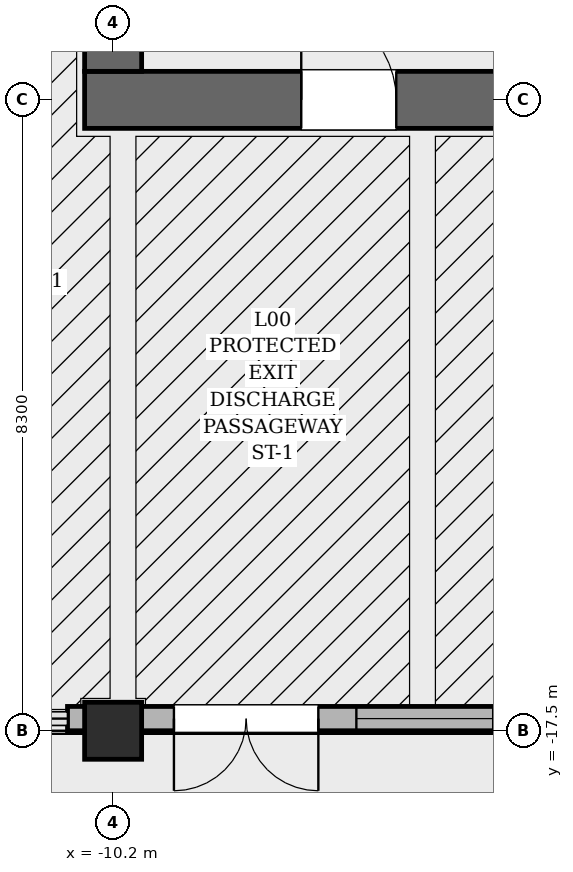
"""IFC4 building model, lengths in metres.
Left out: names, types, materials, properties, quantities, classifications, styles, units other than length and angle.
Written with IfcOpenShell. Run it as: python <this file> out.ifc"""

import sys

from ifc_helpers import new_model, si_unit, direction, frame, frame_2d, origin, origin_2d, place, context, subcontext, project, spatial, rectangle, circle, extrude, element, fill, save


model = new_model("IFC4")
c1 = context("Model", 3, precision=1e-05, world=origin(), true_north=direction((0.0, 1.0)))
c2 = subcontext(c1, "Body", "Model", "MODEL_VIEW")
j1 = project(units=[si_unit("LENGTHUNIT", "METRE"), si_unit("PLANEANGLEUNIT", "RADIAN")], contexts=[c1])
p1 = place(None, origin())
s1 = spatial("IfcSite", under=j1, at=p1, CompositionType="ELEMENT")
p2 = place(p1, origin())
s2 = spatial("IfcBuilding", under=s1, at=p2, CompositionType="ELEMENT")
p3 = place(p2, origin())
s3 = spatial("IfcBuildingStorey", under=s2, at=p3, CompositionType="ELEMENT", Elevation=0.0)
p4 = place(p3, frame((10.575, -9.2, 0.0), z_axis=(0.0, 0.0, 1.0), x_axis=(-1.0, 0.0, 0.0)))
e1 = element("IfcWall", 1, at=p4, inside=s3, PredefinedType="SHEAR", context=c2, shape_type="SweptSolid", body=[
    extrude(rectangle(XDim=21.15, YDim=0.75, at=frame_2d((10.575, 0.0))), origin(), (0.0, 0.0, 1.0), 6.0),
])
p5 = place(p4, frame((2.85, 0.0, 0.0)))
e2 = element("IfcOpeningElement", 2, at=p5, cuts=e1, PredefinedType="OPENING", context=c2, shape_type="SweptSolid", body=[
    extrude(rectangle(XDim=1.25, YDim=2.25, at=frame_2d((0.625, 1.125))), frame((0.0, 0.385, 0.0), z_axis=(0.0, -1.0, 0.0), x_axis=(1.0, 0.0, 0.0)), (0.0, 0.0, 1.0), 0.77),
])
p6 = place(p4, frame((17.05, 0.0, 0.0)))
e3 = element("IfcOpeningElement", 3, at=p6, cuts=e1, PredefinedType="OPENING", context=c2, shape_type="SweptSolid", body=[
    extrude(rectangle(XDim=1.25, YDim=2.25, at=frame_2d((0.625, 1.125))), frame((0.0, 0.385, 0.0), z_axis=(0.0, -1.0, 0.0), x_axis=(1.0, 0.0, 0.0)), (0.0, 0.0, 1.0), 0.77),
])
p7 = place(p4, frame((11.075, 0.0, 0.0)))
e4 = element("IfcOpeningElement", 4, at=p7, cuts=e1, PredefinedType="OPENING", context=c2, shape_type="SweptSolid", body=[
    extrude(rectangle(XDim=1.2, YDim=2.3, at=frame_2d((0.6, 1.15))), frame((0.0, 0.385, 0.0), z_axis=(0.0, -1.0, 0.0), x_axis=(1.0, 0.0, 0.0)), (0.0, 0.0, 1.0), 0.77),
])
p8 = place(p4, frame((8.875, 0.0, 0.0)))
e5 = element("IfcOpeningElement", 5, at=p8, cuts=e1, PredefinedType="OPENING", context=c2, shape_type="SweptSolid", body=[
    extrude(rectangle(XDim=1.2, YDim=2.3, at=frame_2d((0.6, 1.15))), frame((0.0, 0.385, 0.0), z_axis=(0.0, -1.0, 0.0), x_axis=(1.0, 0.0, 0.0)), (0.0, 0.0, 1.0), 0.77),
])
p9 = place(p3, frame((-10.2, -8.825, 0.0), z_axis=(0.0, 0.0, 1.0), x_axis=(0.0, 1.0, 0.0)))
e6 = element("IfcWall", 6, at=p9, inside=s3, PredefinedType="SHEAR", context=c2, shape_type="SweptSolid", body=[
    extrude(rectangle(XDim=17.65, YDim=0.75, at=frame_2d((8.825, 0.0))), origin(), (0.0, 0.0, 1.0), 6.0),
])
p10 = place(p9, frame((12.615, 0.0, 0.0)))
e7 = element("IfcOpeningElement", 7, at=p10, cuts=e6, PredefinedType="OPENING", context=c2, shape_type="SweptSolid", body=[
    extrude(rectangle(XDim=1.18, YDim=2.2, at=frame_2d((0.59, 1.1))), frame((0.0, 0.385, 0.0), z_axis=(0.0, -1.0, 0.0), x_axis=(1.0, 0.0, 0.0)), (0.0, 0.0, 1.0), 0.77),
])
p11 = place(p9, frame((14.865, 0.0, 0.0)))
e8 = element("IfcOpeningElement", 8, at=p11, cuts=e6, PredefinedType="OPENING", context=c2, shape_type="SweptSolid", body=[
    extrude(rectangle(XDim=1.12, YDim=2.25, at=frame_2d((0.56, 1.125))), frame((0.0, 0.385, 0.0), z_axis=(0.0, -1.0, 0.0), x_axis=(1.0, 0.0, 0.0)), (0.0, 0.0, 1.0), 0.77),
])
p12 = place(p9, frame((16.245, 0.0, 0.0)))
e9 = element("IfcOpeningElement", 9, at=p12, cuts=e6, PredefinedType="OPENING", context=c2, shape_type="SweptSolid", body=[
    extrude(rectangle(XDim=1.12, YDim=2.25, at=frame_2d((0.56, 1.125))), frame((0.0, 0.385, 0.0), z_axis=(0.0, -1.0, 0.0), x_axis=(1.0, 0.0, 0.0)), (0.0, 0.0, 1.0), 0.77),
])
p13 = place(p3, frame((-10.2, -17.5, 0.0), z_axis=(0.0, 0.0, 1.0), x_axis=(1.0, 0.0, 0.0)))
e10 = element("IfcColumn", 10, at=p13, inside=s3, PredefinedType="PILASTER", context=c2, shape_type="SweptSolid", body=[
    extrude(circle(Radius=0.375, at=origin_2d()), origin(), (0.0, 0.0, 1.0), 6.0),
])
p14 = place(p3, frame((10.8, -17.34, 0.0), z_axis=(0.0, 0.0, 1.0), x_axis=(-1.0, 0.0, 0.0)))
e11 = element("IfcWall", 11, at=p14, inside=s3, PredefinedType="SOLIDWALL", context=c2, shape_type="SweptSolid", body=[
    extrude(rectangle(XDim=21.6, YDim=0.32, at=frame_2d((10.8, 0.0))), origin(), (0.0, 0.0, 1.0), 5.014),
])
p15 = place(p14, frame((1.4, 0.0, 0.0)))
e12 = element("IfcOpeningElement", 12, at=p15, cuts=e11, PredefinedType="OPENING", context=c2, shape_type="SweptSolid", body=[
    extrude(rectangle(XDim=1.9, YDim=2.4, at=frame_2d((0.95, 1.2))), frame((0.0, 0.17, 0.0), z_axis=(0.0, -1.0, 0.0), x_axis=(1.0, 0.0, 0.0)), (0.0, 0.0, 1.0), 0.34),
])
p16 = place(p14, frame((3.8, 0.0, 0.85)))
e13 = element("IfcOpeningElement", 13, at=p16, cuts=e11, PredefinedType="OPENING", context=c2, shape_type="SweptSolid", body=[
    extrude(rectangle(XDim=1.8, YDim=2.8, at=frame_2d((0.9, 1.4))), frame((0.0, 0.17, 0.0), z_axis=(0.0, -1.0, 0.0), x_axis=(1.0, 0.0, 0.0)), (0.0, 0.0, 1.0), 0.34),
])
p17 = place(p14, frame((9.85, 0.0, 0.0)))
e14 = element("IfcOpeningElement", 14, at=p17, cuts=e11, PredefinedType="OPENING", context=c2, shape_type="SweptSolid", body=[
    extrude(rectangle(XDim=1.9, YDim=2.4, at=frame_2d((0.95, 1.2))), frame((0.0, 0.17, 0.0), z_axis=(0.0, -1.0, 0.0), x_axis=(1.0, 0.0, 0.0)), (0.0, 0.0, 1.0), 0.34),
])
p18 = place(p14, frame((16.0, 0.0, 0.85)))
e15 = element("IfcOpeningElement", 15, at=p18, cuts=e11, PredefinedType="OPENING", context=c2, shape_type="SweptSolid", body=[
    extrude(rectangle(XDim=1.8, YDim=2.8, at=frame_2d((0.9, 1.4))), frame((0.0, 0.17, 0.0), z_axis=(0.0, -1.0, 0.0), x_axis=(1.0, 0.0, 0.0)), (0.0, 0.0, 1.0), 0.34),
])
p19 = place(p14, frame((18.3, 0.0, 0.0)))
e16 = element("IfcOpeningElement", 16, at=p19, cuts=e11, PredefinedType="OPENING", context=c2, shape_type="SweptSolid", body=[
    extrude(rectangle(XDim=1.9, YDim=2.4, at=frame_2d((0.95, 1.2))), frame((0.0, 0.17, 0.0), z_axis=(0.0, -1.0, 0.0), x_axis=(1.0, 0.0, 0.0)), (0.0, 0.0, 1.0), 0.34),
])
p20 = place(p18, origin())
e17 = element("IfcWindow", 17, at=p20, inside=s3, PartitioningType="SINGLE_PANEL", PredefinedType="WINDOW", context=c2, shape_type="SweptSolid", body=[
    extrude(rectangle(XDim=1.8, YDim=2.8, at=frame_2d((0.9, 1.4))), frame((0.0, 0.03, 0.0), z_axis=(0.0, -1.0, 0.0), x_axis=(1.0, 0.0, 0.0)), (0.0, 0.0, 1.0), 0.06),
])
fill(e15, e17)
p21 = place(p19, origin())
e18 = element("IfcDoor", 18, at=p21, inside=s3, OperationType="DOUBLE_DOOR_SINGLE_SWING", PredefinedType="DOOR", context=c2, shape_type="SweptSolid", body=[
    extrude(rectangle(XDim=1.9, YDim=2.4, at=frame_2d((0.95, 1.2))), frame((0.0, 0.025, 0.0), z_axis=(0.0, -1.0, 0.0), x_axis=(1.0, 0.0, 0.0)), (0.0, 0.0, 1.0), 0.05),
])
fill(e16, e18)
p22 = place(p6, origin())
e19 = element("IfcDoor", 19, at=p22, inside=s3, OperationType="SINGLE_SWING_RIGHT", PredefinedType="DOOR", context=c2, shape_type="SweptSolid", body=[
    extrude(rectangle(XDim=1.25, YDim=2.25, at=frame_2d((0.625, 1.125))), frame((0.0, 0.025, 0.0), z_axis=(0.0, -1.0, 0.0), x_axis=(1.0, 0.0, 0.0)), (0.0, 0.0, 1.0), 0.05),
])
fill(e3, e19)
save(model, sys.argv[1])
